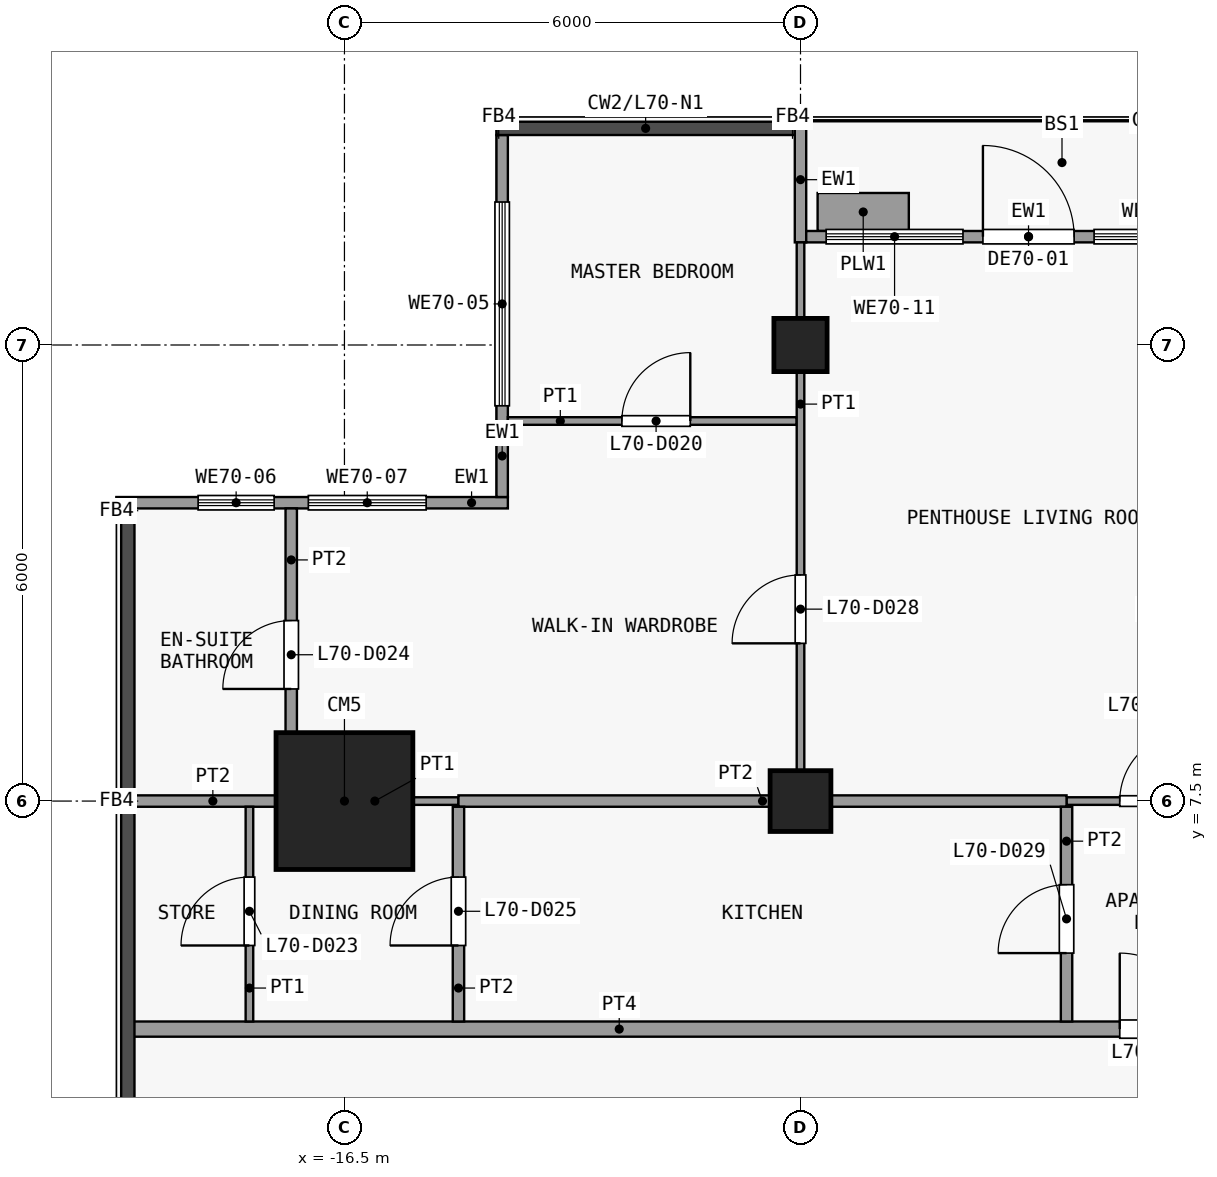
"""IFC4 building model, lengths in metres.
Left out: names, types, materials, properties, quantities, classifications, styles, units other than length and angle.
Written with IfcOpenShell. Run it as: python <this file> out.ifc"""

import sys

from ifc_helpers import new_model, si_unit, direction, frame, frame_2d, origin, origin_2d, place, context, subcontext, project, spatial, rectangle, extrude, element, fill, save


model = new_model("IFC4")
c1 = context("Model", 3, precision=1e-05, world=origin(), true_north=direction((0.0, 1.0)))
c2 = subcontext(c1, "Body", "Model", "MODEL_VIEW")
j1 = project(units=[si_unit("LENGTHUNIT", "METRE"), si_unit("PLANEANGLEUNIT", "RADIAN")], contexts=[c1])
p1 = place(None, origin())
s1 = spatial("IfcSite", under=j1, at=p1, CompositionType="ELEMENT")
p2 = place(p1, origin())
s2 = spatial("IfcBuilding", under=s1, at=p2, CompositionType="ELEMENT")
p3 = place(p2, frame((0.0, 0.0, 277.1)))
s3 = spatial("IfcBuildingStorey", under=s2, at=p3, CompositionType="ELEMENT", Elevation=277.1)
p4 = place(p3, frame((-16.5, 7.5, 0.0), z_axis=(0.0, 0.0, 1.0), x_axis=(1.0, 0.0, 0.0)))
e1 = element("IfcColumn", 1, at=p4, inside=s3, PredefinedType="COLUMN", context=c2, shape_type="SweptSolid", body=[
    extrude(rectangle(XDim=1.8, YDim=1.8, at=origin_2d()), origin(), (0.0, 0.0, 1.0), 3.6),
])
p5 = place(p3, frame((-10.5, 7.5, 0.0), z_axis=(0.0, 0.0, 1.0), x_axis=(1.0, 0.0, 0.0)))
e2 = element("IfcColumn", 2, at=p5, inside=s3, PredefinedType="COLUMN", context=c2, shape_type="SweptSolid", body=[
    extrude(rectangle(XDim=0.8, YDim=0.8, at=origin_2d()), origin(), (0.0, 0.0, 1.0), 3.6),
])
p6 = place(p3, frame((-10.5, 13.5, 0.0), z_axis=(0.0, 0.0, 1.0), x_axis=(1.0, 0.0, 0.0)))
e3 = element("IfcColumn", 3, at=p6, inside=s3, PredefinedType="COLUMN", context=c2, shape_type="SweptSolid", body=[
    extrude(rectangle(XDim=0.7, YDim=0.7, at=origin_2d()), origin(), (0.0, 0.0, 1.0), 3.6),
])
p7 = place(p3, frame((-14.425, 11.5, 0.0), z_axis=(0.0, 0.0, 1.0), x_axis=(0.0, 1.0, 0.0)))
e4 = element("IfcWall", 4, at=p7, inside=s3, PredefinedType="SOLIDWALL", context=c2, shape_type="SweptSolid", body=[
    extrude(rectangle(XDim=4.762, YDim=0.15, at=frame_2d((2.381, 0.0))), origin(), (0.0, 0.0, 1.0), 3.3),
])
p8 = place(p7, frame((1.2, 0.0, 0.9)))
e5 = element("IfcOpeningElement", 5, at=p8, cuts=e4, PredefinedType="OPENING", context=c2, shape_type="SweptSolid", body=[
    extrude(rectangle(XDim=2.681, YDim=2.4, at=frame_2d((1.34, 1.2))), frame((0.0, 0.085, 0.0), z_axis=(0.0, -1.0, 0.0), x_axis=(1.0, 0.0, 0.0)), (0.0, 0.0, 1.0), 0.17),
])
p9 = place(p3, frame((-19.5, 11.425, 0.0), z_axis=(0.0, 0.0, 1.0), x_axis=(1.0, 0.0, 0.0)))
e6 = element("IfcWall", 6, at=p9, inside=s3, PredefinedType="SOLIDWALL", context=c2, shape_type="SweptSolid", body=[
    extrude(rectangle(XDim=5.15, YDim=0.15, at=frame_2d((2.575, 0.0))), origin(), (0.0, 0.0, 1.0), 3.3),
])
p10 = place(p9, frame((1.075, 0.0, 0.9)))
e7 = element("IfcOpeningElement", 7, at=p10, cuts=e6, PredefinedType="OPENING", context=c2, shape_type="SweptSolid", body=[
    extrude(rectangle(XDim=1.0, YDim=2.4, at=frame_2d((0.5, 1.2))), frame((0.0, 0.085, 0.0), z_axis=(0.0, -1.0, 0.0), x_axis=(1.0, 0.0, 0.0)), (0.0, 0.0, 1.0), 0.17),
])
p11 = place(p9, frame((2.525, 0.0, 0.9)))
e8 = element("IfcOpeningElement", 8, at=p11, cuts=e6, PredefinedType="OPENING", context=c2, shape_type="SweptSolid", body=[
    extrude(rectangle(XDim=1.55, YDim=2.4, at=frame_2d((0.775, 1.2))), frame((0.0, 0.085, 0.0), z_axis=(0.0, -1.0, 0.0), x_axis=(1.0, 0.0, 0.0)), (0.0, 0.0, 1.0), 0.17),
])
p12 = place(p3, frame((-10.5, 14.85, 0.0), z_axis=(0.0, 0.0, 1.0), x_axis=(0.0, 1.0, 0.0)))
e9 = element("IfcWall", 9, at=p12, inside=s3, PredefinedType="SOLIDWALL", context=c2, shape_type="SweptSolid", body=[
    extrude(rectangle(XDim=1.65, YDim=0.15, at=frame_2d((0.825, 0.0))), origin(), (0.0, 0.0, 1.0), 3.3),
])
p13 = place(p3, frame((-10.425, 14.925, 0.0), z_axis=(0.0, 0.0, 1.0), x_axis=(1.0, 0.0, 0.0)))
e10 = element("IfcWall", 10, at=p13, inside=s3, PredefinedType="SOLIDWALL", context=c2, shape_type="SweptSolid", body=[
    extrude(rectangle(XDim=5.85, YDim=0.15, at=frame_2d((2.925, 0.0))), origin(), (0.0, 0.0, 1.0), 3.3),
])
p14 = place(p13, frame((2.325, 0.0, 0.0)))
e11 = element("IfcOpeningElement", 11, at=p14, cuts=e10, PredefinedType="OPENING", context=c2, shape_type="SweptSolid", body=[
    extrude(rectangle(XDim=1.2, YDim=2.4, at=frame_2d((0.6, 1.2))), frame((0.0, 0.085, 0.0), z_axis=(0.0, -1.0, 0.0), x_axis=(1.0, 0.0, 0.0)), (0.0, 0.0, 1.0), 0.17),
])
p15 = place(p13, frame((0.262, 0.0, 0.9)))
e12 = element("IfcOpeningElement", 12, at=p15, cuts=e10, PredefinedType="OPENING", context=c2, shape_type="SweptSolid", body=[
    extrude(rectangle(XDim=1.8, YDim=2.1, at=frame_2d((0.9, 1.05))), frame((0.0, 0.085, 0.0), z_axis=(0.0, -1.0, 0.0), x_axis=(1.0, 0.0, 0.0)), (0.0, 0.0, 1.0), 0.17),
])
p16 = place(p13, frame((3.788, 0.0, 0.9)))
e13 = element("IfcOpeningElement", 13, at=p16, cuts=e10, PredefinedType="OPENING", context=c2, shape_type="SweptSolid", body=[
    extrude(rectangle(XDim=1.8, YDim=2.1, at=frame_2d((0.9, 1.05))), frame((0.0, 0.085, 0.0), z_axis=(0.0, -1.0, 0.0), x_axis=(1.0, 0.0, 0.0)), (0.0, 0.0, 1.0), 0.17),
])
p17 = place(p3, frame((-10.275, 15.25, 0.0), z_axis=(0.0, 0.0, 1.0), x_axis=(1.0, 0.0, 0.0)))
e14 = element("IfcWall", 14, at=p17, inside=s3, PredefinedType="USERDEFINED", context=c2, shape_type="SweptSolid", body=[
    extrude(rectangle(XDim=1.2, YDim=0.5, at=frame_2d((0.6, 0.0))), origin(), (0.0, 0.0, 1.0), 0.9),
])
p18 = place(p3, frame((-19.35, 4.5, 0.0), z_axis=(0.0, 0.0, 1.0), x_axis=(1.0, 0.0, 0.0)))
e15 = element("IfcWall", 15, at=p18, inside=s3, PredefinedType="PARTITIONING", context=c2, shape_type="SweptSolid", body=[
    extrude(rectangle(XDim=38.7, YDim=0.2, at=frame_2d((19.35, 0.0))), origin(), (0.0, 0.0, 1.0), 3.3),
])
p19 = place(p18, frame((13.05, 0.0, 0.0)))
e16 = element("IfcOpeningElement", 16, at=p19, cuts=e15, PredefinedType="OPENING", context=c2, shape_type="SweptSolid", body=[
    extrude(rectangle(XDim=1.0, YDim=2.1, at=frame_2d((0.5, 1.05))), frame((0.0, 0.11, 0.0), z_axis=(0.0, -1.0, 0.0), x_axis=(1.0, 0.0, 0.0)), (0.0, 0.0, 1.0), 0.22),
])
p20 = place(p18, frame((27.05, 0.0, 0.0)))
e17 = element("IfcOpeningElement", 17, at=p20, cuts=e15, PredefinedType="OPENING", context=c2, shape_type="SweptSolid", body=[
    extrude(rectangle(XDim=1.0, YDim=2.1, at=frame_2d((0.5, 1.05))), frame((0.0, 0.11, 0.0), z_axis=(0.0, -1.0, 0.0), x_axis=(1.0, 0.0, 0.0)), (0.0, 0.0, 1.0), 0.22),
])
p21 = place(p3, frame((-17.2, 7.5, 0.0), z_axis=(0.0, 0.0, 1.0), x_axis=(1.0, 0.0, 0.0)))
e18 = element("IfcWall", 18, at=p21, inside=s3, PredefinedType="PARTITIONING", context=c2, shape_type="SweptSolid", body=[
    extrude(rectangle(XDim=2.2, YDim=0.1, at=frame_2d((1.1, 0.0))), origin(), (0.0, 0.0, 1.0), 3.3),
])
p22 = place(p3, frame((-7.0, 7.5, 0.0), z_axis=(0.0, 0.0, 1.0), x_axis=(1.0, 0.0, 0.0)))
e19 = element("IfcWall", 19, at=p22, inside=s3, PredefinedType="PARTITIONING", context=c2, shape_type="SweptSolid", body=[
    extrude(rectangle(XDim=2.4, YDim=0.1, at=frame_2d((1.2, 0.0))), origin(), (0.0, 0.0, 1.0), 3.3),
])
p23 = place(p22, frame((0.7, 0.0, 0.0)))
e20 = element("IfcOpeningElement", 20, at=p23, cuts=e19, PredefinedType="OPENING", context=c2, shape_type="SweptSolid", body=[
    extrude(rectangle(XDim=0.9, YDim=2.1, at=frame_2d((0.45, 1.05))), frame((0.0, 0.06, 0.0), z_axis=(0.0, -1.0, 0.0), x_axis=(1.0, 0.0, 0.0)), (0.0, 0.0, 1.0), 0.12),
])
p24 = place(p3, frame((-19.262, 7.5, 0.0), z_axis=(0.0, 0.0, 1.0), x_axis=(1.0, 0.0, 0.0)))
e21 = element("IfcWall", 21, at=p24, inside=s3, PredefinedType="PARTITIONING", context=c2, shape_type="SweptSolid", body=[
    extrude(rectangle(XDim=2.062, YDim=0.15, at=frame_2d((1.031, 0.0))), origin(), (0.0, 0.0, 1.0), 3.3),
])
p25 = place(p3, frame((-15.0, 7.5, 0.0), z_axis=(0.0, 0.0, 1.0), x_axis=(1.0, 0.0, 0.0)))
e22 = element("IfcWall", 22, at=p25, inside=s3, PredefinedType="PARTITIONING", context=c2, shape_type="SweptSolid", body=[
    extrude(rectangle(XDim=8.0, YDim=0.15, at=frame_2d((4.0, 0.0))), origin(), (0.0, 0.0, 1.0), 3.3),
])
p26 = place(p3, frame((-14.35, 12.5, 0.0), z_axis=(0.0, 0.0, 1.0), x_axis=(1.0, 0.0, 0.0)))
e23 = element("IfcWall", 23, at=p26, inside=s3, PredefinedType="PARTITIONING", context=c2, shape_type="SweptSolid", body=[
    extrude(rectangle(XDim=3.8, YDim=0.1, at=frame_2d((1.9, 0.0))), origin(), (0.0, 0.0, 1.0), 3.3),
])
p27 = place(p26, frame((1.5, 0.0, 0.0)))
e24 = element("IfcOpeningElement", 24, at=p27, cuts=e23, PredefinedType="OPENING", context=c2, shape_type="SweptSolid", body=[
    extrude(rectangle(XDim=0.9, YDim=2.1, at=frame_2d((0.45, 1.05))), frame((0.0, 0.06, 0.0), z_axis=(0.0, -1.0, 0.0), x_axis=(1.0, 0.0, 0.0)), (0.0, 0.0, 1.0), 0.12),
])
p28 = place(p3, frame((-17.75, 4.6, 0.0), z_axis=(0.0, 0.0, 1.0), x_axis=(0.0, 1.0, 0.0)))
e25 = element("IfcWall", 25, at=p28, inside=s3, PredefinedType="PARTITIONING", context=c2, shape_type="SweptSolid", body=[
    extrude(rectangle(XDim=2.825, YDim=0.1, at=frame_2d((1.413, 0.0))), origin(), (0.0, 0.0, 1.0), 3.3),
])
p29 = place(p28, frame((1.0, 0.0, 0.0)))
e26 = element("IfcOpeningElement", 26, at=p29, cuts=e25, PredefinedType="OPENING", context=c2, shape_type="SweptSolid", body=[
    extrude(rectangle(XDim=0.9, YDim=2.1, at=frame_2d((0.45, 1.05))), frame((0.0, 0.06, 0.0), z_axis=(0.0, -1.0, 0.0), x_axis=(1.0, 0.0, 0.0)), (0.0, 0.0, 1.0), 0.12),
])
p30 = place(p3, frame((-17.2, 7.575, 0.0), z_axis=(0.0, 0.0, 1.0), x_axis=(0.0, 1.0, 0.0)))
e27 = element("IfcWall", 27, at=p30, inside=s3, PredefinedType="PARTITIONING", context=c2, shape_type="SweptSolid", body=[
    extrude(rectangle(XDim=3.775, YDim=0.15, at=frame_2d((1.888, 0.0))), origin(), (0.0, 0.0, 1.0), 3.3),
])
p31 = place(p30, frame((1.4, 0.0, 0.0)))
e28 = element("IfcOpeningElement", 28, at=p31, cuts=e27, PredefinedType="OPENING", context=c2, shape_type="SweptSolid", body=[
    extrude(rectangle(XDim=0.9, YDim=2.1, at=frame_2d((0.45, 1.05))), frame((0.0, 0.085, 0.0), z_axis=(0.0, -1.0, 0.0), x_axis=(1.0, 0.0, 0.0)), (0.0, 0.0, 1.0), 0.17),
])
p32 = place(p3, frame((-15.0, 4.6, 0.0), z_axis=(0.0, 0.0, 1.0), x_axis=(0.0, 1.0, 0.0)))
e29 = element("IfcWall", 29, at=p32, inside=s3, PredefinedType="PARTITIONING", context=c2, shape_type="SweptSolid", body=[
    extrude(rectangle(XDim=2.825, YDim=0.15, at=frame_2d((1.413, 0.0))), origin(), (0.0, 0.0, 1.0), 3.3),
])
p33 = place(p32, frame((1.0, 0.0, 0.0)))
e30 = element("IfcOpeningElement", 30, at=p33, cuts=e29, PredefinedType="OPENING", context=c2, shape_type="SweptSolid", body=[
    extrude(rectangle(XDim=0.9, YDim=2.1, at=frame_2d((0.45, 1.05))), frame((0.0, 0.085, 0.0), z_axis=(0.0, -1.0, 0.0), x_axis=(1.0, 0.0, 0.0)), (0.0, 0.0, 1.0), 0.17),
])
p34 = place(p3, frame((-10.5, 7.575, 0.0), z_axis=(0.0, 0.0, 1.0), x_axis=(0.0, 1.0, 0.0)))
e31 = element("IfcWall", 31, at=p34, inside=s3, PredefinedType="PARTITIONING", context=c2, shape_type="SweptSolid", body=[
    extrude(rectangle(XDim=7.275, YDim=0.1, at=frame_2d((3.638, 0.0))), origin(), (0.0, 0.0, 1.0), 3.3),
])
p35 = place(p34, frame((2.0, 0.0, 0.0)))
e32 = element("IfcOpeningElement", 32, at=p35, cuts=e31, PredefinedType="OPENING", context=c2, shape_type="SweptSolid", body=[
    extrude(rectangle(XDim=0.9, YDim=2.1, at=frame_2d((0.45, 1.05))), frame((0.0, 0.06, 0.0), z_axis=(0.0, -1.0, 0.0), x_axis=(1.0, 0.0, 0.0)), (0.0, 0.0, 1.0), 0.12),
])
p36 = place(p3, frame((-7.0, 4.6, 0.0), z_axis=(0.0, 0.0, 1.0), x_axis=(0.0, 1.0, 0.0)))
e33 = element("IfcWall", 33, at=p36, inside=s3, PredefinedType="PARTITIONING", context=c2, shape_type="SweptSolid", body=[
    extrude(rectangle(XDim=2.825, YDim=0.15, at=frame_2d((1.413, 0.0))), origin(), (0.0, 0.0, 1.0), 3.3),
])
p37 = place(p36, frame((0.9, 0.0, 0.0)))
e34 = element("IfcOpeningElement", 34, at=p37, cuts=e33, PredefinedType="OPENING", context=c2, shape_type="SweptSolid", body=[
    extrude(rectangle(XDim=0.9, YDim=2.1, at=frame_2d((0.45, 1.05))), frame((0.0, 0.085, 0.0), z_axis=(0.0, -1.0, 0.0), x_axis=(1.0, 0.0, 0.0)), (0.0, 0.0, 1.0), 0.17),
])
p38 = place(p8, origin())
e35 = element("IfcWindow", 35, at=p38, inside=s3, PartitioningType="SINGLE_PANEL", PredefinedType="WINDOW", context=c2, shape_type="SweptSolid", body=[
    extrude(rectangle(XDim=2.681, YDim=2.4, at=frame_2d((1.34, 1.2))), frame((0.0, 0.03, 0.0), z_axis=(0.0, -1.0, 0.0), x_axis=(1.0, 0.0, 0.0)), (0.0, 0.0, 1.0), 0.06),
])
fill(e5, e35)
p39 = place(p10, origin())
e36 = element("IfcWindow", 36, at=p39, inside=s3, PartitioningType="SINGLE_PANEL", PredefinedType="WINDOW", context=c2, shape_type="SweptSolid", body=[
    extrude(rectangle(XDim=1.0, YDim=2.4, at=frame_2d((0.5, 1.2))), frame((0.0, 0.03, 0.0), z_axis=(0.0, -1.0, 0.0), x_axis=(1.0, 0.0, 0.0)), (0.0, 0.0, 1.0), 0.06),
])
fill(e7, e36)
p40 = place(p11, origin())
e37 = element("IfcWindow", 37, at=p40, inside=s3, PartitioningType="SINGLE_PANEL", PredefinedType="WINDOW", context=c2, shape_type="SweptSolid", body=[
    extrude(rectangle(XDim=1.55, YDim=2.4, at=frame_2d((0.775, 1.2))), frame((0.0, 0.03, 0.0), z_axis=(0.0, -1.0, 0.0), x_axis=(1.0, 0.0, 0.0)), (0.0, 0.0, 1.0), 0.06),
])
fill(e8, e37)
p41 = place(p14, origin())
e38 = element("IfcDoor", 38, at=p41, inside=s3, OperationType="SINGLE_SWING_LEFT", PredefinedType="DOOR", context=c2, shape_type="SweptSolid", body=[
    extrude(rectangle(XDim=1.2, YDim=2.4, at=frame_2d((0.6, 1.2))), frame((0.0, 0.025, 0.0), z_axis=(0.0, -1.0, 0.0), x_axis=(1.0, 0.0, 0.0)), (0.0, 0.0, 1.0), 0.05),
])
fill(e11, e38)
p42 = place(p15, origin())
e39 = element("IfcWindow", 39, at=p42, inside=s3, PartitioningType="SINGLE_PANEL", PredefinedType="WINDOW", context=c2, shape_type="SweptSolid", body=[
    extrude(rectangle(XDim=1.8, YDim=2.1, at=frame_2d((0.9, 1.05))), frame((0.0, 0.03, 0.0), z_axis=(0.0, -1.0, 0.0), x_axis=(1.0, 0.0, 0.0)), (0.0, 0.0, 1.0), 0.06),
])
fill(e12, e39)
p43 = place(p16, origin())
e40 = element("IfcWindow", 40, at=p43, inside=s3, PartitioningType="SINGLE_PANEL", PredefinedType="WINDOW", context=c2, shape_type="SweptSolid", body=[
    extrude(rectangle(XDim=1.8, YDim=2.1, at=frame_2d((0.9, 1.05))), frame((0.0, 0.03, 0.0), z_axis=(0.0, -1.0, 0.0), x_axis=(1.0, 0.0, 0.0)), (0.0, 0.0, 1.0), 0.06),
])
fill(e13, e40)
p44 = place(p19, origin())
e41 = element("IfcDoor", 41, at=p44, inside=s3, OperationType="SINGLE_SWING_RIGHT", PredefinedType="DOOR", context=c2, shape_type="SweptSolid", body=[
    extrude(rectangle(XDim=1.0, YDim=2.1, at=frame_2d((0.5, 1.05))), frame((0.0, 0.025, 0.0), z_axis=(0.0, -1.0, 0.0), x_axis=(1.0, 0.0, 0.0)), (0.0, 0.0, 1.0), 0.05),
])
fill(e16, e41)
p45 = place(p23, origin())
e42 = element("IfcDoor", 42, at=p45, inside=s3, OperationType="SINGLE_SWING_LEFT", PredefinedType="DOOR", context=c2, shape_type="SweptSolid", body=[
    extrude(rectangle(XDim=0.9, YDim=2.1, at=frame_2d((0.45, 1.05))), frame((0.0, 0.025, 0.0), z_axis=(0.0, -1.0, 0.0), x_axis=(1.0, 0.0, 0.0)), (0.0, 0.0, 1.0), 0.05),
])
fill(e20, e42)
p46 = place(p27, origin())
e43 = element("IfcDoor", 43, at=p46, inside=s3, OperationType="SINGLE_SWING_LEFT", PredefinedType="DOOR", context=c2, shape_type="SweptSolid", body=[
    extrude(rectangle(XDim=0.9, YDim=2.1, at=frame_2d((0.45, 1.05))), frame((0.0, 0.025, 0.0), z_axis=(0.0, -1.0, 0.0), x_axis=(1.0, 0.0, 0.0)), (0.0, 0.0, 1.0), 0.05),
])
fill(e24, e43)
p47 = place(p29, origin())
e44 = element("IfcDoor", 44, at=p47, inside=s3, OperationType="SINGLE_SWING_RIGHT", PredefinedType="DOOR", context=c2, shape_type="SweptSolid", body=[
    extrude(rectangle(XDim=0.9, YDim=2.1, at=frame_2d((0.45, 1.05))), frame((0.0, 0.025, 0.0), z_axis=(0.0, -1.0, 0.0), x_axis=(1.0, 0.0, 0.0)), (0.0, 0.0, 1.0), 0.05),
])
fill(e26, e44)
p48 = place(p31, origin())
e45 = element("IfcDoor", 45, at=p48, inside=s3, OperationType="SINGLE_SWING_RIGHT", PredefinedType="DOOR", context=c2, shape_type="SweptSolid", body=[
    extrude(rectangle(XDim=0.9, YDim=2.1, at=frame_2d((0.45, 1.05))), frame((0.0, 0.025, 0.0), z_axis=(0.0, -1.0, 0.0), x_axis=(1.0, 0.0, 0.0)), (0.0, 0.0, 1.0), 0.05),
])
fill(e28, e45)
p49 = place(p33, origin())
e46 = element("IfcDoor", 46, at=p49, inside=s3, OperationType="SINGLE_SWING_RIGHT", PredefinedType="DOOR", context=c2, shape_type="SweptSolid", body=[
    extrude(rectangle(XDim=0.9, YDim=2.1, at=frame_2d((0.45, 1.05))), frame((0.0, 0.025, 0.0), z_axis=(0.0, -1.0, 0.0), x_axis=(1.0, 0.0, 0.0)), (0.0, 0.0, 1.0), 0.05),
])
fill(e30, e46)
p50 = place(p35, origin())
e47 = element("IfcDoor", 47, at=p50, inside=s3, OperationType="SINGLE_SWING_RIGHT", PredefinedType="DOOR", context=c2, shape_type="SweptSolid", body=[
    extrude(rectangle(XDim=0.9, YDim=2.1, at=frame_2d((0.45, 1.05))), frame((0.0, 0.025, 0.0), z_axis=(0.0, -1.0, 0.0), x_axis=(1.0, 0.0, 0.0)), (0.0, 0.0, 1.0), 0.05),
])
fill(e32, e47)
p51 = place(p37, origin())
e48 = element("IfcDoor", 48, at=p51, inside=s3, OperationType="SINGLE_SWING_RIGHT", PredefinedType="DOOR", context=c2, shape_type="SweptSolid", body=[
    extrude(rectangle(XDim=0.9, YDim=2.1, at=frame_2d((0.45, 1.05))), frame((0.0, 0.025, 0.0), z_axis=(0.0, -1.0, 0.0), x_axis=(1.0, 0.0, 0.0)), (0.0, 0.0, 1.0), 0.05),
])
fill(e34, e48)
save(model, sys.argv[1])
